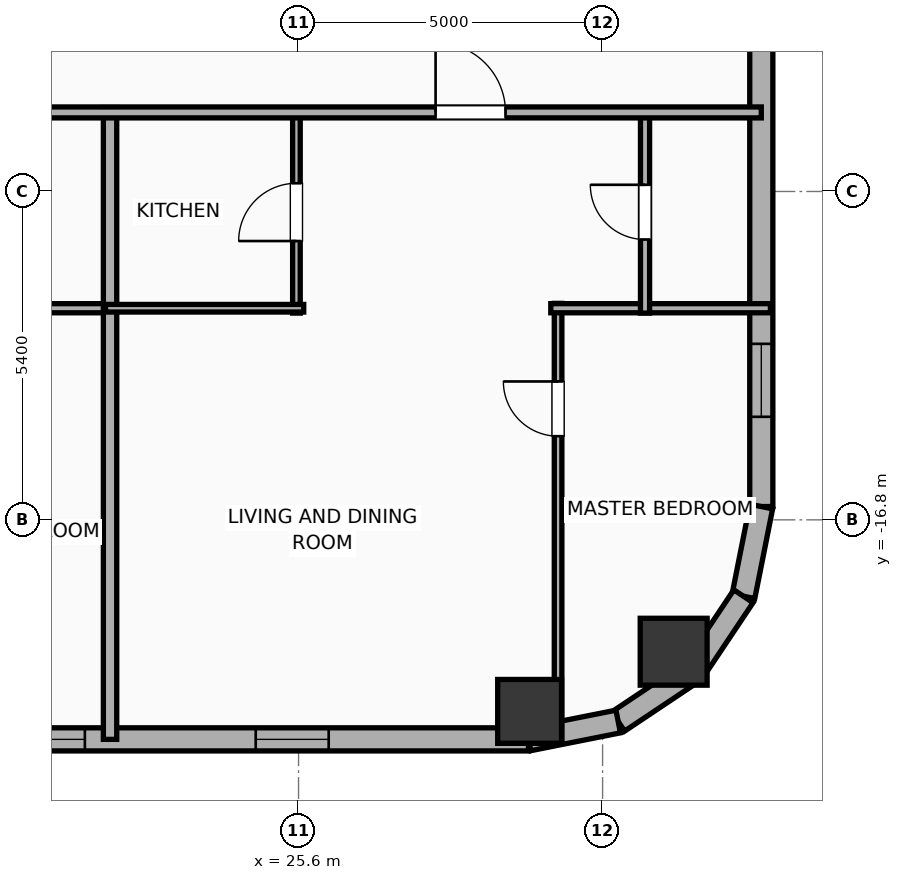
"""IFC4 building model, lengths in metres.
Left out: names, types, materials, properties, quantities, classifications, styles, units other than length and angle.
Written with IfcOpenShell. Run it as: python <this file> out.ifc"""

import sys

from ifc_helpers import new_model, si_unit, direction, frame, frame_2d, origin, origin_2d, place, context, subcontext, project, spatial, rectangle, hollow_rectangle, hollow_circle, extrude, element, fill, save


model = new_model("IFC4")
c1 = context("Model", 3, precision=1e-05, world=origin(), true_north=direction((0.0, 1.0)))
c2 = subcontext(c1, "Body", "Model", "MODEL_VIEW")
j1 = project(units=[si_unit("LENGTHUNIT", "METRE"), si_unit("PLANEANGLEUNIT", "RADIAN")], contexts=[c1])
p1 = place(None, origin())
s1 = spatial("IfcSite", under=j1, at=p1, CompositionType="ELEMENT")
p2 = place(p1, origin())
s2 = spatial("IfcBuilding", under=s1, at=p2, CompositionType="ELEMENT")
p3 = place(p2, frame((0.0, 0.0, 136.5)))
s3 = spatial("IfcBuildingStorey", under=s2, at=p3, CompositionType="ELEMENT", Elevation=136.5)
p4 = place(p3, frame((29.4, -19.95, 0.0), z_axis=(0.0, 0.0, 1.0), x_axis=(1.0, 0.0, 0.0)))
e1 = element("IfcColumn", 1, at=p4, inside=s3, PredefinedType="COLUMN", context=c2, shape_type="SweptSolid", body=[
    extrude(hollow_rectangle(XDim=1.05, YDim=1.05, WallThickness=0.036, at=origin_2d()), origin(), (0.0, 0.0, 1.0), 3.865),
])
p5 = place(p3, frame((31.769, -18.969, 0.0), z_axis=(0.0, 0.0, 1.0), x_axis=(1.0, 0.0, 0.0)))
e2 = element("IfcColumn", 2, at=p5, inside=s3, PredefinedType="COLUMN", context=c2, shape_type="SweptSolid", body=[
    extrude(hollow_circle(Radius=0.55, WallThickness=0.036, at=origin_2d()), origin(), (0.0, 0.0, 1.0), 3.865),
])
p6 = place(p3, frame((29.381, -20.41, 0.0), z_axis=(0.0, 0.0, 1.0), x_axis=(-1.0, 0.0, 0.0)))
e3 = element("IfcWall", 3, at=p6, inside=s3, PredefinedType="ELEMENTEDWALL", context=c2, shape_type="SweptSolid", body=[
    extrude(rectangle(XDim=54.763, YDim=0.38, at=frame_2d((27.381, 0.0))), origin(), (0.0, 0.0, 1.0), 2.39),
])
p7 = place(p6, frame((7.295, 0.0, 0.75)))
e4 = element("IfcOpeningElement", 4, at=p7, cuts=e3, PredefinedType="OPENING", context=c2, shape_type="SweptSolid", body=[
    extrude(rectangle(XDim=2.4, YDim=1.45, at=frame_2d((1.2, 0.725))), frame((0.0, 0.2, 0.0), z_axis=(0.0, -1.0, 0.0), x_axis=(1.0, 0.0, 0.0)), (0.0, 0.0, 1.0), 0.4),
])
p8 = place(p6, frame((18.486, 0.0, 0.75)))
e5 = element("IfcOpeningElement", 5, at=p8, cuts=e3, PredefinedType="OPENING", context=c2, shape_type="SweptSolid", body=[
    extrude(rectangle(XDim=2.4, YDim=1.45, at=frame_2d((1.2, 0.725))), frame((0.0, 0.2, 0.0), z_axis=(0.0, -1.0, 0.0), x_axis=(1.0, 0.0, 0.0)), (0.0, 0.0, 1.0), 0.4),
])
p9 = place(p6, frame((33.877, 0.0, 0.75)))
e6 = element("IfcOpeningElement", 6, at=p9, cuts=e3, PredefinedType="OPENING", context=c2, shape_type="SweptSolid", body=[
    extrude(rectangle(XDim=2.4, YDim=1.45, at=frame_2d((1.2, 0.725))), frame((0.0, 0.2, 0.0), z_axis=(0.0, -1.0, 0.0), x_axis=(1.0, 0.0, 0.0)), (0.0, 0.0, 1.0), 0.4),
])
p10 = place(p6, frame((48.367, 0.0, 0.75)))
e7 = element("IfcOpeningElement", 7, at=p10, cuts=e3, PredefinedType="OPENING", context=c2, shape_type="SweptSolid", body=[
    extrude(rectangle(XDim=2.4, YDim=1.45, at=frame_2d((1.2, 0.725))), frame((0.0, 0.2, 0.0), z_axis=(0.0, -1.0, 0.0), x_axis=(1.0, 0.0, 0.0)), (0.0, 0.0, 1.0), 0.4),
])
p11 = place(p6, frame((52.277, 0.0, 0.55)))
e8 = element("IfcOpeningElement", 8, at=p11, cuts=e3, PredefinedType="OPENING", context=c2, shape_type="SweptSolid", body=[
    extrude(rectangle(XDim=1.2, YDim=1.15, at=frame_2d((0.6, 0.575))), frame((0.0, 0.2, 0.0), z_axis=(0.0, -1.0, 0.0), x_axis=(1.0, 0.0, 0.0)), (0.0, 0.0, 1.0), 0.4),
])
p12 = place(p6, frame((45.486, 0.0, 0.55)))
e9 = element("IfcOpeningElement", 9, at=p12, cuts=e3, PredefinedType="OPENING", context=c2, shape_type="SweptSolid", body=[
    extrude(rectangle(XDim=1.2, YDim=1.15, at=frame_2d((0.6, 0.575))), frame((0.0, 0.2, 0.0), z_axis=(0.0, -1.0, 0.0), x_axis=(1.0, 0.0, 0.0)), (0.0, 0.0, 1.0), 0.4),
])
p13 = place(p6, frame((41.736, 0.0, 0.55)))
e10 = element("IfcOpeningElement", 10, at=p13, cuts=e3, PredefinedType="OPENING", context=c2, shape_type="SweptSolid", body=[
    extrude(rectangle(XDim=1.2, YDim=1.15, at=frame_2d((0.6, 0.575))), frame((0.0, 0.2, 0.0), z_axis=(0.0, -1.0, 0.0), x_axis=(1.0, 0.0, 0.0)), (0.0, 0.0, 1.0), 0.4),
])
p14 = place(p6, frame((37.986, 0.0, 0.55)))
e11 = element("IfcOpeningElement", 11, at=p14, cuts=e3, PredefinedType="OPENING", context=c2, shape_type="SweptSolid", body=[
    extrude(rectangle(XDim=1.2, YDim=1.15, at=frame_2d((0.6, 0.575))), frame((0.0, 0.2, 0.0), z_axis=(0.0, -1.0, 0.0), x_axis=(1.0, 0.0, 0.0)), (0.0, 0.0, 1.0), 0.4),
])
p15 = place(p6, frame((30.486, 0.0, 0.55)))
e12 = element("IfcOpeningElement", 12, at=p15, cuts=e3, PredefinedType="OPENING", context=c2, shape_type="SweptSolid", body=[
    extrude(rectangle(XDim=1.2, YDim=1.15, at=frame_2d((0.6, 0.575))), frame((0.0, 0.2, 0.0), z_axis=(0.0, -1.0, 0.0), x_axis=(1.0, 0.0, 0.0)), (0.0, 0.0, 1.0), 0.4),
])
p16 = place(p6, frame((26.736, 0.0, 0.55)))
e13 = element("IfcOpeningElement", 13, at=p16, cuts=e3, PredefinedType="OPENING", context=c2, shape_type="SweptSolid", body=[
    extrude(rectangle(XDim=1.2, YDim=1.15, at=frame_2d((0.6, 0.575))), frame((0.0, 0.2, 0.0), z_axis=(0.0, -1.0, 0.0), x_axis=(1.0, 0.0, 0.0)), (0.0, 0.0, 1.0), 0.4),
])
p17 = place(p6, frame((22.986, 0.0, 0.55)))
e14 = element("IfcOpeningElement", 14, at=p17, cuts=e3, PredefinedType="OPENING", context=c2, shape_type="SweptSolid", body=[
    extrude(rectangle(XDim=1.2, YDim=1.15, at=frame_2d((0.6, 0.575))), frame((0.0, 0.2, 0.0), z_axis=(0.0, -1.0, 0.0), x_axis=(1.0, 0.0, 0.0)), (0.0, 0.0, 1.0), 0.4),
])
p18 = place(p6, frame((15.486, 0.0, 0.55)))
e15 = element("IfcOpeningElement", 15, at=p18, cuts=e3, PredefinedType="OPENING", context=c2, shape_type="SweptSolid", body=[
    extrude(rectangle(XDim=1.2, YDim=1.15, at=frame_2d((0.6, 0.575))), frame((0.0, 0.2, 0.0), z_axis=(0.0, -1.0, 0.0), x_axis=(1.0, 0.0, 0.0)), (0.0, 0.0, 1.0), 0.4),
])
p19 = place(p6, frame((11.736, 0.0, 0.55)))
e16 = element("IfcOpeningElement", 16, at=p19, cuts=e3, PredefinedType="OPENING", context=c2, shape_type="SweptSolid", body=[
    extrude(rectangle(XDim=1.2, YDim=1.15, at=frame_2d((0.6, 0.575))), frame((0.0, 0.2, 0.0), z_axis=(0.0, -1.0, 0.0), x_axis=(1.0, 0.0, 0.0)), (0.0, 0.0, 1.0), 0.4),
])
p20 = place(p6, frame((3.286, 0.0, 0.55)))
e17 = element("IfcOpeningElement", 17, at=p20, cuts=e3, PredefinedType="OPENING", context=c2, shape_type="SweptSolid", body=[
    extrude(rectangle(XDim=1.2, YDim=1.15, at=frame_2d((0.6, 0.575))), frame((0.0, 0.2, 0.0), z_axis=(0.0, -1.0, 0.0), x_axis=(1.0, 0.0, 0.0)), (0.0, 0.0, 1.0), 0.4),
])
p21 = place(p3, frame((33.21, 17.781, 0.0), z_axis=(0.0, 0.0, 1.0), x_axis=(0.0, -1.0, 0.0)))
e18 = element("IfcWall", 18, at=p21, inside=s3, PredefinedType="ELEMENTEDWALL", context=c2, shape_type="SweptSolid", body=[
    extrude(rectangle(XDim=34.363, YDim=0.38, at=frame_2d((17.181, 0.0))), origin(), (0.0, 0.0, 1.0), 2.39),
])
p22 = place(p21, frame((31.687, 0.0, 0.55)))
e19 = element("IfcOpeningElement", 19, at=p22, cuts=e18, PredefinedType="OPENING", context=c2, shape_type="SweptSolid", body=[
    extrude(rectangle(XDim=1.2, YDim=1.15, at=frame_2d((0.6, 0.575))), frame((0.0, 0.2, 0.0), z_axis=(0.0, -1.0, 0.0), x_axis=(1.0, 0.0, 0.0)), (0.0, 0.0, 1.0), 0.4),
])
p23 = place(p21, frame((12.836, 0.0, 0.55)))
e20 = element("IfcOpeningElement", 20, at=p23, cuts=e18, PredefinedType="OPENING", context=c2, shape_type="SweptSolid", body=[
    extrude(rectangle(XDim=1.2, YDim=1.15, at=frame_2d((0.6, 0.575))), frame((0.0, 0.2, 0.0), z_axis=(0.0, -1.0, 0.0), x_axis=(1.0, 0.0, 0.0)), (0.0, 0.0, 1.0), 0.4),
])
p24 = place(p21, frame((21.386, 0.0, 0.55)))
e21 = element("IfcOpeningElement", 21, at=p24, cuts=e18, PredefinedType="OPENING", context=c2, shape_type="SweptSolid", body=[
    extrude(rectangle(XDim=1.2, YDim=1.15, at=frame_2d((0.6, 0.575))), frame((0.0, 0.2, 0.0), z_axis=(0.0, -1.0, 0.0), x_axis=(1.0, 0.0, 0.0)), (0.0, 0.0, 1.0), 0.4),
])
p25 = place(p3, frame((33.21, -16.581, 0.0), z_axis=(0.0, 0.0, 1.0), x_axis=(-0.195086038585, -0.980786132421, 0.0)))
e22 = element("IfcWall", 22, at=p25, inside=s3, PredefinedType="ELEMENTEDWALL", context=c2, shape_type="SweptSolid", body=[
    extrude(rectangle(XDim=1.504, YDim=0.38, at=frame_2d((0.752, 0.0))), origin(), (0.0, 0.0, 1.0), 3.5),
])
p26 = place(p3, frame((32.917, -18.057, 0.0), z_axis=(0.0, 0.0, 1.0), x_axis=(-0.555610286119, -0.831442848281, 0.0)))
e23 = element("IfcWall", 23, at=p26, inside=s3, PredefinedType="ELEMENTEDWALL", context=c2, shape_type="SweptSolid", body=[
    extrude(rectangle(XDim=1.485, YDim=0.38, at=frame_2d((0.743, 0.0))), origin(), (0.0, 0.0, 1.0), 3.5),
])
p27 = place(p3, frame((32.091, -19.292, 0.0), z_axis=(0.0, 0.0, 1.0), x_axis=(-0.831468045563, -0.555572577804, 0.0)))
e24 = element("IfcWall", 24, at=p27, inside=s3, PredefinedType="ELEMENTEDWALL", context=c2, shape_type="SweptSolid", body=[
    extrude(rectangle(XDim=1.485, YDim=0.38, at=frame_2d((0.742, 0.0))), origin(), (0.0, 0.0, 1.0), 2.39),
])
p28 = place(p3, frame((30.857, -20.116, 0.0), z_axis=(0.0, 0.0, 1.0), x_axis=(-0.980786132421, -0.195086038585, 0.0)))
e25 = element("IfcWall", 25, at=p28, inside=s3, PredefinedType="ELEMENTEDWALL", context=c2, shape_type="SweptSolid", body=[
    extrude(rectangle(XDim=1.504, YDim=0.38, at=frame_2d((0.752, 0.0))), origin(), (0.0, 0.0, 1.0), 2.39),
])
p29 = place(p3, frame((18.97, -13.32, 0.0), z_axis=(0.0, 0.0, 1.0), x_axis=(1.0, 0.0, 0.0)))
e26 = element("IfcWall", 26, at=p29, inside=s3, PredefinedType="PLUMBINGWALL", context=c2, shape_type="SweptSolid", body=[
    extrude(rectangle(XDim=3.605, YDim=0.15, at=frame_2d((1.802, 0.0))), origin(), (0.0, 0.0, 1.0), 3.5),
])
p30 = place(p3, frame((22.5, -20.41, 0.0), z_axis=(0.0, 0.0, 1.0), x_axis=(0.0, 1.0, 0.0)))
e27 = element("IfcWall", 27, at=p30, inside=s3, PredefinedType="PARTITIONING", context=c2, shape_type="SweptSolid", body=[
    extrude(rectangle(XDim=10.39, YDim=0.22, at=frame_2d((5.195, 0.0))), origin(), (0.0, 0.0, 1.0), 3.5),
])
p31 = place(p3, frame((29.868, -20.466, 0.0), z_axis=(0.0, 0.0, 1.0), x_axis=(0.0, 1.0, 0.0)))
e28 = element("IfcWall", 28, at=p31, inside=s3, PredefinedType="PARTITIONING", context=c2, shape_type="SweptSolid", body=[
    extrude(rectangle(XDim=7.226, YDim=0.125, at=frame_2d((3.613, 0.0))), origin(), (0.0, 0.0, 1.0), 3.5),
])
p32 = place(p31, frame((5.042, 0.0, 0.0)))
e29 = element("IfcOpeningElement", 29, at=p32, cuts=e28, PredefinedType="OPENING", context=c2, shape_type="SweptSolid", body=[
    extrude(rectangle(XDim=0.9, YDim=2.05, at=frame_2d((0.45, 1.025))), frame((0.0, 0.073, 0.0), z_axis=(0.0, -1.0, 0.0), x_axis=(1.0, 0.0, 0.0)), (0.0, 0.0, 1.0), 0.145),
])
p33 = place(p3, frame((29.748, -13.32, 0.0), z_axis=(0.0, 0.0, 1.0), x_axis=(1.0, 0.0, 0.0)))
e30 = element("IfcWall", 30, at=p33, inside=s3, PredefinedType="PLUMBINGWALL", context=c2, shape_type="SweptSolid", body=[
    extrude(rectangle(XDim=3.612, YDim=0.15, at=frame_2d((1.806, 0.0))), origin(), (0.0, 0.0, 1.0), 3.5),
])
p34 = place(p3, frame((25.565, -13.4, 0.0), z_axis=(0.0, 0.0, 1.0), x_axis=(0.0, 1.0, 0.0)))
e31 = element("IfcWall", 31, at=p34, inside=s3, PredefinedType="PARTITIONING", context=c2, shape_type="SweptSolid", body=[
    extrude(rectangle(XDim=3.32, YDim=0.125, at=frame_2d((1.66, 0.0))), origin(), (0.0, 0.0, 1.0), 3.5),
])
p35 = place(p34, frame((1.185, 0.0, 0.0)))
e32 = element("IfcOpeningElement", 32, at=p35, cuts=e31, PredefinedType="OPENING", context=c2, shape_type="SweptSolid", body=[
    extrude(rectangle(XDim=0.95, YDim=2.05, at=frame_2d((0.475, 1.025))), frame((0.0, 0.073, 0.0), z_axis=(0.0, -1.0, 0.0), x_axis=(1.0, 0.0, 0.0)), (0.0, 0.0, 1.0), 0.145),
])
p36 = place(p3, frame((22.425, -13.32, 0.0), z_axis=(0.0, 0.0, 1.0), x_axis=(1.0, 0.0, 0.0)))
e33 = element("IfcWall", 33, at=p36, inside=s3, PredefinedType="PARTITIONING", context=c2, shape_type="SweptSolid", body=[
    extrude(rectangle(XDim=3.26, YDim=0.125, at=frame_2d((1.63, 0.0))), origin(), (0.0, 0.0, 1.0), 3.5),
])
p37 = place(p3, frame((31.298, -13.4, 0.0), z_axis=(0.0, 0.0, 1.0), x_axis=(0.0, 1.0, 0.0)))
e34 = element("IfcWall", 34, at=p37, inside=s3, PredefinedType="PLUMBINGWALL", context=c2, shape_type="SweptSolid", body=[
    extrude(rectangle(XDim=3.32, YDim=0.15, at=frame_2d((1.66, 0.0))), origin(), (0.0, 0.0, 1.0), 3.5),
])
p38 = place(p37, frame((1.21, 0.0, 0.0)))
e35 = element("IfcOpeningElement", 35, at=p38, cuts=e34, PredefinedType="OPENING", context=c2, shape_type="SweptSolid", body=[
    extrude(rectangle(XDim=0.9, YDim=2.05, at=frame_2d((0.45, 1.025))), frame((0.0, 0.085, 0.0), z_axis=(0.0, -1.0, 0.0), x_axis=(1.0, 0.0, 0.0)), (0.0, 0.0, 1.0), 0.17),
])
p39 = place(p3, frame((-29.21, -10.1, 0.0), z_axis=(0.0, 0.0, 1.0), x_axis=(1.0, 0.0, 0.0)))
e36 = element("IfcWall", 36, at=p39, inside=s3, PredefinedType="PARTITIONING", context=c2, shape_type="SweptSolid", body=[
    extrude(rectangle(XDim=62.42, YDim=0.18, at=frame_2d((31.21, 0.0))), origin(), (0.0, 0.0, 1.0), 2.39),
])
p40 = place(p39, frame((3.002, 0.0, 0.0)))
e37 = element("IfcOpeningElement", 37, at=p40, cuts=e36, PredefinedType="OPENING", context=c2, shape_type="SweptSolid", body=[
    extrude(rectangle(XDim=0.9, YDim=2.05, at=frame_2d((0.45, 1.025))), frame((0.0, 0.1, 0.0), z_axis=(0.0, -1.0, 0.0), x_axis=(1.0, 0.0, 0.0)), (0.0, 0.0, 1.0), 0.2),
])
p41 = place(p39, frame((10.049, 0.0, 0.0)))
e38 = element("IfcOpeningElement", 38, at=p41, cuts=e36, PredefinedType="OPENING", context=c2, shape_type="SweptSolid", body=[
    extrude(rectangle(XDim=1.15, YDim=2.05, at=frame_2d((0.575, 1.025))), frame((0.0, 0.1, 0.0), z_axis=(0.0, -1.0, 0.0), x_axis=(1.0, 0.0, 0.0)), (0.0, 0.0, 1.0), 0.2),
])
p42 = place(p39, frame((17.552, 0.0, 0.0)))
e39 = element("IfcOpeningElement", 39, at=p42, cuts=e36, PredefinedType="OPENING", context=c2, shape_type="SweptSolid", body=[
    extrude(rectangle(XDim=1.15, YDim=2.05, at=frame_2d((0.575, 1.025))), frame((0.0, 0.1, 0.0), z_axis=(0.0, -1.0, 0.0), x_axis=(1.0, 0.0, 0.0)), (0.0, 0.0, 1.0), 0.2),
])
p43 = place(p39, frame((25.048, 0.0, 0.0)))
e40 = element("IfcOpeningElement", 40, at=p43, cuts=e36, PredefinedType="OPENING", context=c2, shape_type="SweptSolid", body=[
    extrude(rectangle(XDim=1.15, YDim=2.05, at=frame_2d((0.575, 1.025))), frame((0.0, 0.1, 0.0), z_axis=(0.0, -1.0, 0.0), x_axis=(1.0, 0.0, 0.0)), (0.0, 0.0, 1.0), 0.2),
])
p44 = place(p39, frame((32.551, 0.0, 0.0)))
e41 = element("IfcOpeningElement", 41, at=p44, cuts=e36, PredefinedType="OPENING", context=c2, shape_type="SweptSolid", body=[
    extrude(rectangle(XDim=1.15, YDim=2.05, at=frame_2d((0.575, 1.025))), frame((0.0, 0.1, 0.0), z_axis=(0.0, -1.0, 0.0), x_axis=(1.0, 0.0, 0.0)), (0.0, 0.0, 1.0), 0.2),
])
p45 = place(p39, frame((40.048, 0.0, 0.0)))
e42 = element("IfcOpeningElement", 42, at=p45, cuts=e36, PredefinedType="OPENING", context=c2, shape_type="SweptSolid", body=[
    extrude(rectangle(XDim=1.15, YDim=2.05, at=frame_2d((0.575, 1.025))), frame((0.0, 0.1, 0.0), z_axis=(0.0, -1.0, 0.0), x_axis=(1.0, 0.0, 0.0)), (0.0, 0.0, 1.0), 0.2),
])
p46 = place(p39, frame((47.551, 0.0, 0.0)))
e43 = element("IfcOpeningElement", 43, at=p46, cuts=e36, PredefinedType="OPENING", context=c2, shape_type="SweptSolid", body=[
    extrude(rectangle(XDim=1.15, YDim=2.05, at=frame_2d((0.575, 1.025))), frame((0.0, 0.1, 0.0), z_axis=(0.0, -1.0, 0.0), x_axis=(1.0, 0.0, 0.0)), (0.0, 0.0, 1.0), 0.2),
])
p47 = place(p39, frame((57.064, 0.0, 0.0)))
e44 = element("IfcOpeningElement", 44, at=p47, cuts=e36, PredefinedType="OPENING", context=c2, shape_type="SweptSolid", body=[
    extrude(rectangle(XDim=1.15, YDim=2.05, at=frame_2d((0.575, 1.025))), frame((0.0, 0.1, 0.0), z_axis=(0.0, -1.0, 0.0), x_axis=(1.0, 0.0, 0.0)), (0.0, 0.0, 1.0), 0.2),
])
p48 = place(p7, origin())
e45 = element("IfcWindow", 45, at=p48, inside=s3, PartitioningType="SINGLE_PANEL", PredefinedType="WINDOW", context=c2, shape_type="SweptSolid", body=[
    extrude(rectangle(XDim=2.4, YDim=1.45, at=frame_2d((1.2, 0.725))), frame((0.0, 0.03, 0.0), z_axis=(0.0, -1.0, 0.0), x_axis=(1.0, 0.0, 0.0)), (0.0, 0.0, 1.0), 0.06),
])
fill(e4, e45)
p49 = place(p20, origin())
e46 = element("IfcWindow", 46, at=p49, inside=s3, PartitioningType="SINGLE_PANEL", PredefinedType="WINDOW", context=c2, shape_type="SweptSolid", body=[
    extrude(rectangle(XDim=1.2, YDim=1.15, at=frame_2d((0.6, 0.575))), frame((0.0, 0.03, 0.0), z_axis=(0.0, -1.0, 0.0), x_axis=(1.0, 0.0, 0.0)), (0.0, 0.0, 1.0), 0.06),
])
fill(e17, e46)
p50 = place(p22, origin())
e47 = element("IfcWindow", 47, at=p50, inside=s3, PartitioningType="SINGLE_PANEL", PredefinedType="WINDOW", context=c2, shape_type="SweptSolid", body=[
    extrude(rectangle(XDim=1.2, YDim=1.15, at=frame_2d((0.6, 0.575))), frame((0.0, 0.03, 0.0), z_axis=(0.0, -1.0, 0.0), x_axis=(1.0, 0.0, 0.0)), (0.0, 0.0, 1.0), 0.06),
])
fill(e19, e47)
p51 = place(p32, origin())
e48 = element("IfcDoor", 48, at=p51, inside=s3, OperationType="SINGLE_SWING_RIGHT", PredefinedType="DOOR", context=c2, shape_type="SweptSolid", body=[
    extrude(rectangle(XDim=0.9, YDim=2.05, at=frame_2d((0.45, 1.025))), frame((0.0, 0.025, 0.0), z_axis=(0.0, -1.0, 0.0), x_axis=(1.0, 0.0, 0.0)), (0.0, 0.0, 1.0), 0.05),
])
fill(e29, e48)
p52 = place(p35, origin())
e49 = element("IfcDoor", 49, at=p52, inside=s3, OperationType="SINGLE_SWING_LEFT", PredefinedType="DOOR", context=c2, shape_type="SweptSolid", body=[
    extrude(rectangle(XDim=0.95, YDim=2.05, at=frame_2d((0.475, 1.025))), frame((0.0, 0.025, 0.0), z_axis=(0.0, -1.0, 0.0), x_axis=(1.0, 0.0, 0.0)), (0.0, 0.0, 1.0), 0.05),
])
fill(e32, e49)
p53 = place(p38, origin())
e50 = element("IfcDoor", 50, at=p53, inside=s3, OperationType="SINGLE_SWING_RIGHT", PredefinedType="DOOR", context=c2, shape_type="SweptSolid", body=[
    extrude(rectangle(XDim=0.9, YDim=2.05, at=frame_2d((0.45, 1.025))), frame((0.0, 0.025, 0.0), z_axis=(0.0, -1.0, 0.0), x_axis=(1.0, 0.0, 0.0)), (0.0, 0.0, 1.0), 0.05),
])
fill(e35, e50)
p54 = place(p47, origin())
e51 = element("IfcDoor", 51, at=p54, inside=s3, OperationType="SINGLE_SWING_LEFT", PredefinedType="DOOR", context=c2, shape_type="SweptSolid", body=[
    extrude(rectangle(XDim=1.15, YDim=2.05, at=frame_2d((0.575, 1.025))), frame((0.0, 0.025, 0.0), z_axis=(0.0, -1.0, 0.0), x_axis=(1.0, 0.0, 0.0)), (0.0, 0.0, 1.0), 0.05),
])
fill(e44, e51)
save(model, sys.argv[1])
